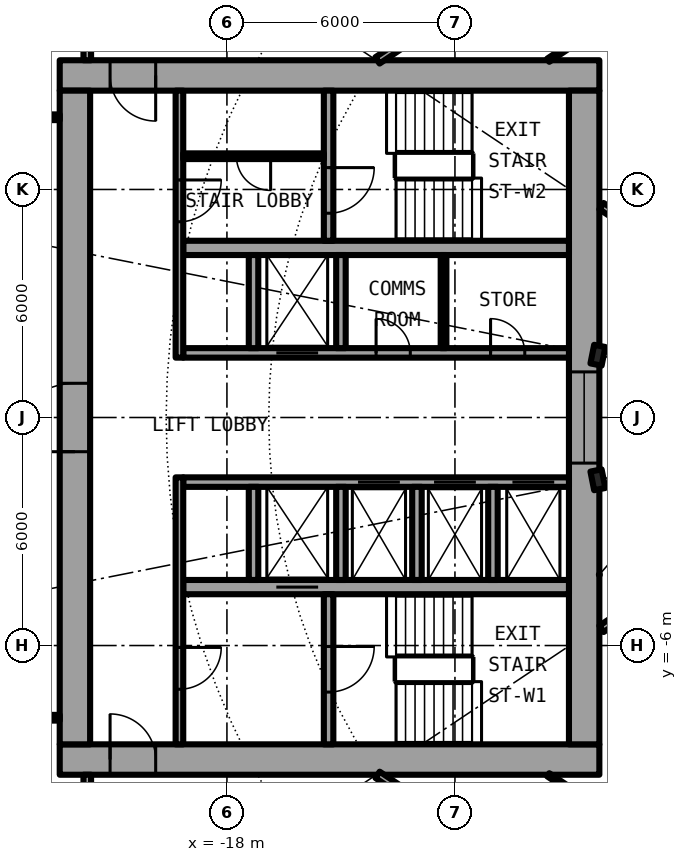
"""IFC4 building model, lengths in metres.
Left out: names, types, materials, properties, quantities, classifications, styles, units other than length and angle.
Written with IfcOpenShell. Run it as: python <this file> out.ifc"""

import sys

from ifc_helpers import new_model, si_unit, direction, frame, frame_2d, origin, origin_2d, place, context, subcontext, project, spatial, rectangle, i_section, extrude, element, fill, save


model = new_model("IFC4")
c1 = context("Model", 3, precision=1e-05, world=origin(), true_north=direction((0.0, 1.0)))
c2 = subcontext(c1, "Body", "Model", "MODEL_VIEW")
j1 = project(units=[si_unit("LENGTHUNIT", "METRE"), si_unit("PLANEANGLEUNIT", "RADIAN")], contexts=[c1])
p1 = place(None, origin())
s1 = spatial("IfcSite", under=j1, at=p1, CompositionType="ELEMENT")
p2 = place(p1, origin())
s2 = spatial("IfcBuilding", under=s1, at=p2, CompositionType="ELEMENT")
p3 = place(p2, frame((0.0, 0.0, 31.95)))
s3 = spatial("IfcBuildingStorey", under=s2, at=p3, CompositionType="ELEMENT", Elevation=31.95)
for number, where, z_axis, x_axis in (
    (1, (-8.239, 1.639, 0.0), (0.0, 0.0, 1.0), (-0.981, 0.195, 0.0)),
    (2, (-8.239, -1.639, 0.0), (0.0, 0.0, 1.0), (-0.981, -0.195, 0.0)),
):
    element("IfcColumn", number, at=place(p3, frame(where, z_axis=z_axis, x_axis=x_axis)), inside=s3, PredefinedType="COLUMN", context=c2, shape_type="SweptSolid", body=[
        extrude(i_section(OverallWidth=0.3, OverallDepth=0.5, WebThickness=0.014, FlangeThickness=0.028, FilletRadius=0.027, at=origin_2d()), origin(), (0.0, 0.0, 1.0), 3.05),
    ])
p4 = place(p3, frame((-22.4, -9.0, 0.0), z_axis=(0.0, 0.0, 1.0), x_axis=(1.0, 0.0, 0.0)))
e3 = element("IfcWall", 3, at=p4, inside=s3, PredefinedType="SHEAR", context=c2, shape_type="SweptSolid", body=[
    extrude(rectangle(XDim=14.2, YDim=0.8, at=frame_2d((7.1, 0.0))), origin(), (0.0, 0.0, 1.0), 3.05),
])
p5 = place(p4, frame((1.325, 0.0, 0.0)))
e4 = element("IfcOpeningElement", 4, at=p5, cuts=e3, PredefinedType="OPENING", context=c2, shape_type="SweptSolid", body=[
    extrude(rectangle(XDim=1.2, YDim=2.3, at=frame_2d((0.6, 1.15))), frame((0.0, 0.41, 0.0), z_axis=(0.0, -1.0, 0.0), x_axis=(1.0, 0.0, 0.0)), (0.0, 0.0, 1.0), 0.82),
])
p6 = place(p3, frame((-8.2, 9.0, 0.0), z_axis=(0.0, 0.0, 1.0), x_axis=(-1.0, 0.0, 0.0)))
e5 = element("IfcWall", 5, at=p6, inside=s3, PredefinedType="SHEAR", context=c2, shape_type="SweptSolid", body=[
    extrude(rectangle(XDim=14.2, YDim=0.8, at=frame_2d((7.1, 0.0))), origin(), (0.0, 0.0, 1.0), 3.05),
])
p7 = place(p6, frame((11.675, 0.0, 0.0)))
e6 = element("IfcOpeningElement", 6, at=p7, cuts=e5, PredefinedType="OPENING", context=c2, shape_type="SweptSolid", body=[
    extrude(rectangle(XDim=1.2, YDim=2.3, at=frame_2d((0.6, 1.15))), frame((0.0, 0.41, 0.0), z_axis=(0.0, -1.0, 0.0), x_axis=(1.0, 0.0, 0.0)), (0.0, 0.0, 1.0), 0.82),
])
p8 = place(p3, frame((-22.0, -8.6, 0.0), z_axis=(0.0, 0.0, 1.0), x_axis=(0.0, 1.0, 0.0)))
e7 = element("IfcWall", 7, at=p8, inside=s3, PredefinedType="SHEAR", context=c2, shape_type="SweptSolid", body=[
    extrude(rectangle(XDim=17.2, YDim=0.8, at=frame_2d((8.6, 0.0))), origin(), (0.0, 0.0, 1.0), 3.05),
])
p9 = place(p8, frame((7.7, 0.0, 0.0)))
e8 = element("IfcOpeningElement", 8, at=p9, cuts=e7, PredefinedType="OPENING", context=c2, shape_type="SweptSolid", body=[
    extrude(rectangle(XDim=1.8, YDim=2.3, at=frame_2d((0.9, 1.15))), frame((0.0, 0.41, 0.0), z_axis=(0.0, -1.0, 0.0), x_axis=(1.0, 0.0, 0.0)), (0.0, 0.0, 1.0), 0.82),
])
p10 = place(p3, frame((-8.6, 8.6, 0.0), z_axis=(0.0, 0.0, 1.0), x_axis=(0.0, -1.0, 0.0)))
e9 = element("IfcWall", 9, at=p10, inside=s3, PredefinedType="SHEAR", context=c2, shape_type="SweptSolid", body=[
    extrude(rectangle(XDim=17.2, YDim=0.8, at=frame_2d((8.6, 0.0))), origin(), (0.0, 0.0, 1.0), 3.05),
])
p11 = place(p10, frame((7.4, 0.0, 0.1)))
e10 = element("IfcOpeningElement", 10, at=p11, cuts=e9, PredefinedType="OPENING", context=c2, shape_type="SweptSolid", body=[
    extrude(rectangle(XDim=2.4, YDim=2.2, at=frame_2d((1.2, 1.1))), frame((0.0, 0.41, 0.0), z_axis=(0.0, -1.0, 0.0), x_axis=(1.0, 0.0, 0.0)), (0.0, 0.0, 1.0), 0.82),
])
p12 = place(p3, frame((-9.0, -1.7, 0.0), z_axis=(0.0, 0.0, 1.0), x_axis=(-1.0, 0.0, 0.0)))
e11 = element("IfcWall", 11, at=p12, inside=s3, PredefinedType="SHEAR", context=c2, shape_type="SweptSolid", body=[
    extrude(rectangle(XDim=10.15, YDim=0.25, at=frame_2d((5.075, 0.0))), origin(), (0.0, 0.0, 1.0), 3.05),
])
p13 = place(p12, frame((0.387, 0.0, 0.0)))
e12 = element("IfcOpeningElement", 12, at=p13, cuts=e11, PredefinedType="OPENING", context=c2, shape_type="SweptSolid", body=[
    extrude(rectangle(XDim=1.1, YDim=2.3, at=frame_2d((0.55, 1.15))), frame((0.0, 0.135, 0.0), z_axis=(0.0, -1.0, 0.0), x_axis=(1.0, 0.0, 0.0)), (0.0, 0.0, 1.0), 0.27),
])
p14 = place(p12, frame((2.45, 0.0, 0.0)))
e13 = element("IfcOpeningElement", 13, at=p14, cuts=e11, PredefinedType="OPENING", context=c2, shape_type="SweptSolid", body=[
    extrude(rectangle(XDim=1.1, YDim=2.3, at=frame_2d((0.55, 1.15))), frame((0.0, 0.135, 0.0), z_axis=(0.0, -1.0, 0.0), x_axis=(1.0, 0.0, 0.0)), (0.0, 0.0, 1.0), 0.27),
])
p15 = place(p12, frame((4.45, 0.0, 0.0)))
e14 = element("IfcOpeningElement", 14, at=p15, cuts=e11, PredefinedType="OPENING", context=c2, shape_type="SweptSolid", body=[
    extrude(rectangle(XDim=1.1, YDim=2.3, at=frame_2d((0.55, 1.15))), frame((0.0, 0.135, 0.0), z_axis=(0.0, -1.0, 0.0), x_axis=(1.0, 0.0, 0.0)), (0.0, 0.0, 1.0), 0.27),
])
p16 = place(p3, frame((-9.0, -4.462, 0.0), z_axis=(0.0, 0.0, 1.0), x_axis=(-1.0, 0.0, 0.0)))
e15 = element("IfcWall", 15, at=p16, inside=s3, PredefinedType="SHEAR", context=c2, shape_type="SweptSolid", body=[
    extrude(rectangle(XDim=10.15, YDim=0.375, at=frame_2d((5.075, 0.0))), origin(), (0.0, 0.0, 1.0), 3.05),
])
p17 = place(p16, frame((6.6, 0.0, 0.0)))
e16 = element("IfcOpeningElement", 16, at=p17, cuts=e15, PredefinedType="OPENING", context=c2, shape_type="SweptSolid", body=[
    extrude(rectangle(XDim=1.1, YDim=2.3, at=frame_2d((0.55, 1.15))), frame((0.0, 0.198, 0.0), z_axis=(0.0, -1.0, 0.0), x_axis=(1.0, 0.0, 0.0)), (0.0, 0.0, 1.0), 0.395),
])
p18 = place(p3, frame((-15.325, -4.65, 0.0), z_axis=(0.0, 0.0, 1.0), x_axis=(0.0, -1.0, 0.0)))
e17 = element("IfcWall", 17, at=p18, inside=s3, PredefinedType="SHEAR", context=c2, shape_type="SweptSolid", body=[
    extrude(rectangle(XDim=3.95, YDim=0.25, at=frame_2d((1.975, 0.0))), origin(), (0.0, 0.0, 1.0), 3.05),
])
p19 = place(p18, frame((1.375, 0.0, 0.0)))
e18 = element("IfcOpeningElement", 18, at=p19, cuts=e17, PredefinedType="OPENING", context=c2, shape_type="SweptSolid", body=[
    extrude(rectangle(XDim=1.2, YDim=2.3, at=frame_2d((0.6, 1.15))), frame((0.0, 0.135, 0.0), z_axis=(0.0, -1.0, 0.0), x_axis=(1.0, 0.0, 0.0)), (0.0, 0.0, 1.0), 0.27),
])
for number, where, z_axis, x_axis in (
    (19, (-15.0, -1.825, 0.0), (0.0, 0.0, 1.0), (0.0, -1.0, 0.0)),
    (20, (-17.3, -1.825, 0.0), (0.0, 0.0, 1.0), (0.0, -1.0, 0.0)),
):
    element("IfcWall", number, at=place(p3, frame(where, z_axis=z_axis, x_axis=x_axis)), inside=s3, PredefinedType="SOLIDWALL", context=c2, shape_type="SweptSolid", body=[
        extrude(rectangle(XDim=2.45, YDim=0.25, at=frame_2d((1.225, 0.0))), origin(), (0.0, 0.0, 1.0), 2.7),
    ])
p20 = place(p3, frame((-19.25, -1.575, 0.0), z_axis=(0.0, 0.0, 1.0), x_axis=(0.0, -1.0, 0.0)))
e21 = element("IfcWall", 21, at=p20, inside=s3, PredefinedType="SOLIDWALL", context=c2, shape_type="SweptSolid", body=[
    extrude(rectangle(XDim=7.025, YDim=0.2, at=frame_2d((3.513, 0.0))), origin(), (0.0, 0.0, 1.0), 2.7),
])
p21 = place(p20, frame((4.475, 0.0, 0.0)))
e22 = element("IfcOpeningElement", 22, at=p21, cuts=e21, PredefinedType="OPENING", context=c2, shape_type="SweptSolid", body=[
    extrude(rectangle(XDim=1.1, YDim=2.3, at=frame_2d((0.55, 1.15))), frame((0.0, 0.11, 0.0), z_axis=(0.0, -1.0, 0.0), x_axis=(1.0, 0.0, 0.0)), (0.0, 0.0, 1.0), 0.22),
])
p22 = place(p3, frame((-19.15, 1.7, 0.0), z_axis=(0.0, 0.0, 1.0), x_axis=(1.0, 0.0, 0.0)))
e23 = element("IfcWall", 23, at=p22, inside=s3, PredefinedType="SHEAR", context=c2, shape_type="SweptSolid", body=[
    extrude(rectangle(XDim=10.15, YDim=0.25, at=frame_2d((5.075, 0.0))), origin(), (0.0, 0.0, 1.0), 3.05),
])
p23 = place(p22, frame((2.45, 0.0, 0.0)))
e24 = element("IfcOpeningElement", 24, at=p23, cuts=e23, PredefinedType="OPENING", context=c2, shape_type="SweptSolid", body=[
    extrude(rectangle(XDim=1.1, YDim=2.3, at=frame_2d((0.55, 1.15))), frame((0.0, 0.135, 0.0), z_axis=(0.0, -1.0, 0.0), x_axis=(1.0, 0.0, 0.0)), (0.0, 0.0, 1.0), 0.27),
])
p24 = place(p22, frame((8.087, 0.0, 0.0)))
e25 = element("IfcOpeningElement", 25, at=p24, cuts=e23, PredefinedType="OPENING", context=c2, shape_type="SweptSolid", body=[
    extrude(rectangle(XDim=0.9, YDim=2.3, at=frame_2d((0.45, 1.15))), frame((0.0, 0.135, 0.0), z_axis=(0.0, -1.0, 0.0), x_axis=(1.0, 0.0, 0.0)), (0.0, 0.0, 1.0), 0.27),
])
p25 = place(p22, frame((5.075, 0.0, 0.0)))
e26 = element("IfcOpeningElement", 26, at=p25, cuts=e23, PredefinedType="OPENING", context=c2, shape_type="SweptSolid", body=[
    extrude(rectangle(XDim=0.9, YDim=2.3, at=frame_2d((0.45, 1.15))), frame((0.0, 0.135, 0.0), z_axis=(0.0, -1.0, 0.0), x_axis=(1.0, 0.0, 0.0)), (0.0, 0.0, 1.0), 0.27),
])
p26 = place(p3, frame((-9.0, 4.462, 0.0), z_axis=(0.0, 0.0, 1.0), x_axis=(-1.0, 0.0, 0.0)))
e27 = element("IfcWall", 27, at=p26, inside=s3, PredefinedType="SHEAR", context=c2, shape_type="SweptSolid", body=[
    extrude(rectangle(XDim=10.15, YDim=0.375, at=frame_2d((5.075, 0.0))), origin(), (0.0, 0.0, 1.0), 3.05),
])
p27 = place(p3, frame((-15.325, 8.6, 0.0), z_axis=(0.0, 0.0, 1.0), x_axis=(0.0, -1.0, 0.0)))
e28 = element("IfcWall", 28, at=p27, inside=s3, PredefinedType="SHEAR", context=c2, shape_type="SweptSolid", body=[
    extrude(rectangle(XDim=3.95, YDim=0.25, at=frame_2d((1.975, 0.0))), origin(), (0.0, 0.0, 1.0), 3.05),
])
p28 = place(p27, frame((2.025, 0.0, 0.0)))
e29 = element("IfcOpeningElement", 29, at=p28, cuts=e28, PredefinedType="OPENING", context=c2, shape_type="SweptSolid", body=[
    extrude(rectangle(XDim=1.2, YDim=2.3, at=frame_2d((0.6, 1.15))), frame((0.0, 0.135, 0.0), z_axis=(0.0, -1.0, 0.0), x_axis=(1.0, 0.0, 0.0)), (0.0, 0.0, 1.0), 0.27),
])
for number, where, z_axis, x_axis in (
    (30, (-15.0, 1.825, 0.0), (0.0, 0.0, 1.0), (0.0, 1.0, 0.0)),
    (31, (-17.3, 1.825, 0.0), (0.0, 0.0, 1.0), (0.0, 1.0, 0.0)),
):
    element("IfcWall", number, at=place(p3, frame(where, z_axis=z_axis, x_axis=x_axis)), inside=s3, PredefinedType="SOLIDWALL", context=c2, shape_type="SweptSolid", body=[
        extrude(rectangle(XDim=2.45, YDim=0.25, at=frame_2d((1.225, 0.0))), origin(), (0.0, 0.0, 1.0), 2.7),
    ])
p29 = place(p3, frame((-19.25, 8.6, 0.0), z_axis=(0.0, 0.0, 1.0), x_axis=(0.0, -1.0, 0.0)))
e32 = element("IfcWall", 32, at=p29, inside=s3, PredefinedType="SOLIDWALL", context=c2, shape_type="SweptSolid", body=[
    extrude(rectangle(XDim=7.025, YDim=0.2, at=frame_2d((3.513, 0.0))), origin(), (0.0, 0.0, 1.0), 2.7),
])
p30 = place(p29, frame((2.35, 0.0, 0.0)))
e33 = element("IfcOpeningElement", 33, at=p30, cuts=e32, PredefinedType="OPENING", context=c2, shape_type="SweptSolid", body=[
    extrude(rectangle(XDim=1.1, YDim=2.3, at=frame_2d((0.55, 1.15))), frame((0.0, 0.11, 0.0), z_axis=(0.0, -1.0, 0.0), x_axis=(1.0, 0.0, 0.0)), (0.0, 0.0, 1.0), 0.22),
])
for number, where, z_axis, x_axis in (
    (34, (-11.0, -1.825, 0.0), (0.0, 0.0, 1.0), (0.0, -1.0, 0.0)),
    (35, (-13.0, -1.825, 0.0), (0.0, 0.0, 1.0), (0.0, -1.0, 0.0)),
):
    element("IfcWall", number, at=place(p3, frame(where, z_axis=z_axis, x_axis=x_axis)), inside=s3, PredefinedType="SOLIDWALL", context=c2, shape_type="SweptSolid", body=[
        extrude(rectangle(XDim=2.45, YDim=0.25, at=frame_2d((1.225, 0.0))), origin(), (0.0, 0.0, 1.0), 2.7),
    ])
p31 = place(p3, frame((-12.3, 1.825, 0.0), z_axis=(0.0, 0.0, 1.0), x_axis=(0.0, 1.0, 0.0)))
e36 = element("IfcWall", 36, at=p31, inside=s3, PredefinedType="PARTITIONING", context=c2, shape_type="SweptSolid", body=[
    extrude(rectangle(XDim=2.45, YDim=0.15, at=frame_2d((1.225, 0.0))), origin(), (0.0, 0.0, 1.0), 2.7),
])
p32 = place(p3, frame((-15.45, 6.875, 0.0), z_axis=(0.0, 0.0, 1.0), x_axis=(-1.0, 0.0, 0.0)))
e37 = element("IfcWall", 37, at=p32, inside=s3, PredefinedType="PARTITIONING", context=c2, shape_type="SweptSolid", body=[
    extrude(rectangle(XDim=3.7, YDim=0.15, at=frame_2d((1.85, 0.0))), origin(), (0.0, 0.0, 1.0), 2.7),
])
p33 = place(p32, frame((1.4, 0.0, 0.0)))
e38 = element("IfcOpeningElement", 38, at=p33, cuts=e37, PredefinedType="OPENING", context=c2, shape_type="SweptSolid", body=[
    extrude(rectangle(XDim=0.9, YDim=2.3, at=frame_2d((0.45, 1.15))), frame((0.0, 0.085, 0.0), z_axis=(0.0, -1.0, 0.0), x_axis=(1.0, 0.0, 0.0)), (0.0, 0.0, 1.0), 0.17),
])
for number, where, z_axis, x_axis in (
    (39, (-22.4, 7.9, 0.0), (0.0, 0.0, 1.0), (-1.0, 0.0, 0.0)),
    (40, (-22.4, -7.9, 0.0), (0.0, 0.0, 1.0), (-1.0, 0.0, 0.0)),
):
    element("IfcWall", number, at=place(p3, frame(where, z_axis=z_axis, x_axis=x_axis)), inside=s3, PredefinedType="PARTITIONING", context=c2, shape_type="SweptSolid", body=[
        extrude(rectangle(XDim=2.54, YDim=0.15, at=frame_2d((1.27, 0.0))), origin(), (0.0, 0.0, 1.0), 2.7),
    ])
p34 = place(p3, frame((-14.036, -9.402, 0.0), z_axis=(0.0, 0.0, 1.0), x_axis=(0.831561346449, -0.555432918625, 0.0)))
e41 = element("IfcWall", 41, at=p34, inside=s3, PredefinedType="PARTITIONING", context=c2, shape_type="SweptSolid", body=[
    extrude(rectangle(XDim=12.914, YDim=0.2, at=frame_2d((6.457, 0.0))), origin(), (0.0, 0.0, 1.0), 2.7),
])
p35 = place(p34, frame((7.566, 0.0, 0.0)))
e42 = element("IfcOpeningElement", 42, at=p35, cuts=e41, PredefinedType="OPENING", context=c2, shape_type="SweptSolid", body=[
    extrude(rectangle(XDim=1.0, YDim=2.3, at=frame_2d((0.5, 1.15))), frame((0.0, 0.11, 0.0), z_axis=(0.0, -1.0, 0.0), x_axis=(1.0, 0.0, 0.0)), (0.0, 0.0, 1.0), 0.22),
])
p36 = place(p3, frame((-9.545, -9.401, 0.0), z_axis=(0.0, 0.0, 1.0), x_axis=(0.831459707426, -0.555585056429, 0.0)))
e43 = element("IfcWall", 43, at=p36, inside=s3, PredefinedType="PARTITIONING", context=c2, shape_type="SweptSolid", body=[
    extrude(rectangle(XDim=4.073, YDim=0.1, at=frame_2d((2.037, 0.0))), origin(), (0.0, 0.0, 1.0), 2.7),
])
for number, where, z_axis, x_axis in (
    (44, (-6.513, -4.472, 0.0), (0.0, 0.0, 1.0), (-0.831, -0.556, 0.0)),
    (45, (-6.513, 4.472, 0.0), (0.0, 0.0, 1.0), (-0.831, 0.556, 0.0)),
):
    element("IfcWall", number, at=place(p3, frame(where, z_axis=z_axis, x_axis=x_axis)), inside=s3, PredefinedType="PARTITIONING", context=c2, shape_type="SweptSolid", body=[
        extrude(rectangle(XDim=1.962, YDim=0.2, at=frame_2d((0.981, 0.0))), origin(), (0.0, 0.0, 1.0), 2.7),
    ])
p37 = place(p3, frame((-9.546, 9.4, 0.0), z_axis=(0.0, 0.0, 1.0), x_axis=(0.831459707426, 0.555585056429, 0.0)))
e46 = element("IfcWall", 46, at=p37, inside=s3, PredefinedType="PARTITIONING", context=c2, shape_type="SweptSolid", body=[
    extrude(rectangle(XDim=4.073, YDim=0.1, at=frame_2d((2.037, 0.0))), origin(), (0.0, 0.0, 1.0), 2.7),
])
p38 = place(p3, frame((-14.039, 9.396, 0.0), z_axis=(0.0, 0.0, 1.0), x_axis=(0.831348689697, 0.555751163866, 0.0)))
e47 = element("IfcWall", 47, at=p38, inside=s3, PredefinedType="PARTITIONING", context=c2, shape_type="SweptSolid", body=[
    extrude(rectangle(XDim=12.914, YDim=0.2, at=frame_2d((6.457, 0.0))), origin(), (0.0, 0.0, 1.0), 2.7),
])
p39 = place(p38, frame((7.568, 0.0, 0.0)))
e48 = element("IfcOpeningElement", 48, at=p39, cuts=e47, PredefinedType="OPENING", context=c2, shape_type="SweptSolid", body=[
    extrude(rectangle(XDim=1.0, YDim=2.3, at=frame_2d((0.5, 1.15))), frame((0.0, 0.11, 0.0), z_axis=(0.0, -1.0, 0.0), x_axis=(1.0, 0.0, 0.0)), (0.0, 0.0, 1.0), 0.22),
])
for number, where, z_axis, x_axis in (
    (49, (-21.675, -11.0, 0.0), (0.0, 0.0, 1.0), (0.0, 1.0, 0.0)),
    (50, (-21.675, 9.4, 0.0), (0.0, 0.0, 1.0), (0.0, 1.0, 0.0)),
):
    element("IfcWall", number, at=place(p3, frame(where, z_axis=z_axis, x_axis=x_axis)), inside=s3, PredefinedType="PARTITIONING", context=c2, shape_type="SweptSolid", body=[
        extrude(rectangle(XDim=1.6, YDim=0.2, at=frame_2d((0.8, 0.0))), origin(), (0.0, 0.0, 1.0), 2.7),
    ])
p40 = place(p13, origin())
e51 = element("IfcDoor", 51, at=p40, inside=s3, OperationType="DOUBLE_DOOR_SLIDING", PredefinedType="DOOR", context=c2, shape_type="SweptSolid", body=[
    extrude(rectangle(XDim=1.1, YDim=2.3, at=frame_2d((0.55, 1.15))), frame((0.0, 0.025, 0.0), z_axis=(0.0, -1.0, 0.0), x_axis=(1.0, 0.0, 0.0)), (0.0, 0.0, 1.0), 0.05),
])
fill(e12, e51)
p41 = place(p14, origin())
e52 = element("IfcDoor", 52, at=p41, inside=s3, OperationType="DOUBLE_DOOR_SLIDING", PredefinedType="DOOR", context=c2, shape_type="SweptSolid", body=[
    extrude(rectangle(XDim=1.1, YDim=2.3, at=frame_2d((0.55, 1.15))), frame((0.0, 0.025, 0.0), z_axis=(0.0, -1.0, 0.0), x_axis=(1.0, 0.0, 0.0)), (0.0, 0.0, 1.0), 0.05),
])
fill(e13, e52)
p42 = place(p15, origin())
e53 = element("IfcDoor", 53, at=p42, inside=s3, OperationType="DOUBLE_DOOR_SLIDING", PredefinedType="DOOR", context=c2, shape_type="SweptSolid", body=[
    extrude(rectangle(XDim=1.1, YDim=2.3, at=frame_2d((0.55, 1.15))), frame((0.0, 0.025, 0.0), z_axis=(0.0, -1.0, 0.0), x_axis=(1.0, 0.0, 0.0)), (0.0, 0.0, 1.0), 0.05),
])
fill(e14, e53)
p43 = place(p17, origin())
e54 = element("IfcDoor", 54, at=p43, inside=s3, OperationType="DOUBLE_DOOR_SLIDING", PredefinedType="DOOR", context=c2, shape_type="SweptSolid", body=[
    extrude(rectangle(XDim=1.1, YDim=2.3, at=frame_2d((0.55, 1.15))), frame((0.0, 0.025, 0.0), z_axis=(0.0, -1.0, 0.0), x_axis=(1.0, 0.0, 0.0)), (0.0, 0.0, 1.0), 0.05),
])
fill(e16, e54)
p44 = place(p23, origin())
e55 = element("IfcDoor", 55, at=p44, inside=s3, OperationType="DOUBLE_DOOR_SLIDING", PredefinedType="DOOR", context=c2, shape_type="SweptSolid", body=[
    extrude(rectangle(XDim=1.1, YDim=2.3, at=frame_2d((0.55, 1.15))), frame((0.0, 0.025, 0.0), z_axis=(0.0, -1.0, 0.0), x_axis=(1.0, 0.0, 0.0)), (0.0, 0.0, 1.0), 0.05),
])
fill(e24, e55)
p45 = place(p24, origin())
e56 = element("IfcDoor", 56, at=p45, inside=s3, OperationType="SINGLE_SWING_LEFT", PredefinedType="DOOR", context=c2, shape_type="SweptSolid", body=[
    extrude(rectangle(XDim=0.9, YDim=2.3, at=frame_2d((0.45, 1.15))), frame((0.0, 0.025, 0.0), z_axis=(0.0, -1.0, 0.0), x_axis=(1.0, 0.0, 0.0)), (0.0, 0.0, 1.0), 0.05),
])
fill(e25, e56)
p46 = place(p25, origin())
e57 = element("IfcDoor", 57, at=p46, inside=s3, OperationType="SINGLE_SWING_LEFT", PredefinedType="DOOR", context=c2, shape_type="SweptSolid", body=[
    extrude(rectangle(XDim=0.9, YDim=2.3, at=frame_2d((0.45, 1.15))), frame((0.0, 0.025, 0.0), z_axis=(0.0, -1.0, 0.0), x_axis=(1.0, 0.0, 0.0)), (0.0, 0.0, 1.0), 0.05),
])
fill(e26, e57)
p47 = place(p33, origin())
e58 = element("IfcDoor", 58, at=p47, inside=s3, OperationType="SINGLE_SWING_LEFT", PredefinedType="DOOR", context=c2, shape_type="SweptSolid", body=[
    extrude(rectangle(XDim=0.9, YDim=2.3, at=frame_2d((0.45, 1.15))), frame((0.0, 0.025, 0.0), z_axis=(0.0, -1.0, 0.0), x_axis=(1.0, 0.0, 0.0)), (0.0, 0.0, 1.0), 0.05),
])
fill(e38, e58)
p48 = place(p19, origin())
e59 = element("IfcDoor", 59, at=p48, inside=s3, OperationType="SINGLE_SWING_LEFT", PredefinedType="DOOR", context=c2, shape_type="SweptSolid", body=[
    extrude(rectangle(XDim=1.2, YDim=2.3, at=frame_2d((0.6, 1.15))), frame((0.0, 0.025, 0.0), z_axis=(0.0, -1.0, 0.0), x_axis=(1.0, 0.0, 0.0)), (0.0, 0.0, 1.0), 0.05),
])
fill(e18, e59)
p49 = place(p28, origin())
e60 = element("IfcDoor", 60, at=p49, inside=s3, OperationType="SINGLE_SWING_LEFT", PredefinedType="DOOR", context=c2, shape_type="SweptSolid", body=[
    extrude(rectangle(XDim=1.2, YDim=2.3, at=frame_2d((0.6, 1.15))), frame((0.0, 0.025, 0.0), z_axis=(0.0, -1.0, 0.0), x_axis=(1.0, 0.0, 0.0)), (0.0, 0.0, 1.0), 0.05),
])
fill(e29, e60)
p50 = place(p21, origin())
e61 = element("IfcDoor", 61, at=p50, inside=s3, OperationType="SINGLE_SWING_LEFT", PredefinedType="DOOR", context=c2, shape_type="SweptSolid", body=[
    extrude(rectangle(XDim=1.1, YDim=2.3, at=frame_2d((0.55, 1.15))), frame((0.0, 0.025, 0.0), z_axis=(0.0, -1.0, 0.0), x_axis=(1.0, 0.0, 0.0)), (0.0, 0.0, 1.0), 0.05),
])
fill(e22, e61)
p51 = place(p30, origin())
e62 = element("IfcDoor", 62, at=p51, inside=s3, OperationType="SINGLE_SWING_RIGHT", PredefinedType="DOOR", context=c2, shape_type="SweptSolid", body=[
    extrude(rectangle(XDim=1.1, YDim=2.3, at=frame_2d((0.55, 1.15))), frame((0.0, 0.025, 0.0), z_axis=(0.0, -1.0, 0.0), x_axis=(1.0, 0.0, 0.0)), (0.0, 0.0, 1.0), 0.05),
])
fill(e33, e62)
p52 = place(p5, origin())
e63 = element("IfcDoor", 63, at=p52, inside=s3, OperationType="SINGLE_SWING_RIGHT", PredefinedType="DOOR", context=c2, shape_type="SweptSolid", body=[
    extrude(rectangle(XDim=1.2, YDim=2.3, at=frame_2d((0.6, 1.15))), frame((0.0, 0.025, 0.0), z_axis=(0.0, -1.0, 0.0), x_axis=(1.0, 0.0, 0.0)), (0.0, 0.0, 1.0), 0.05),
])
fill(e4, e63)
p53 = place(p7, origin())
e64 = element("IfcDoor", 64, at=p53, inside=s3, OperationType="SINGLE_SWING_LEFT", PredefinedType="DOOR", context=c2, shape_type="SweptSolid", body=[
    extrude(rectangle(XDim=1.2, YDim=2.3, at=frame_2d((0.6, 1.15))), frame((0.0, 0.025, 0.0), z_axis=(0.0, -1.0, 0.0), x_axis=(1.0, 0.0, 0.0)), (0.0, 0.0, 1.0), 0.05),
])
fill(e6, e64)
p54 = place(p9, origin())
e65 = element("IfcDoor", 65, at=p54, inside=s3, OperationType="SINGLE_SWING_LEFT", PredefinedType="DOOR", context=c2, shape_type="SweptSolid", body=[
    extrude(rectangle(XDim=1.8, YDim=2.3, at=frame_2d((0.9, 1.15))), frame((0.0, 0.025, 0.0), z_axis=(0.0, -1.0, 0.0), x_axis=(1.0, 0.0, 0.0)), (0.0, 0.0, 1.0), 0.05),
])
fill(e8, e65)
p55 = place(p11, origin())
e66 = element("IfcWindow", 66, at=p55, inside=s3, PartitioningType="SINGLE_PANEL", PredefinedType="WINDOW", context=c2, shape_type="SweptSolid", body=[
    extrude(rectangle(XDim=2.4, YDim=2.2, at=frame_2d((1.2, 1.1))), frame((0.0, 0.03, 0.0), z_axis=(0.0, -1.0, 0.0), x_axis=(1.0, 0.0, 0.0)), (0.0, 0.0, 1.0), 0.06),
])
fill(e10, e66)
save(model, sys.argv[1])
